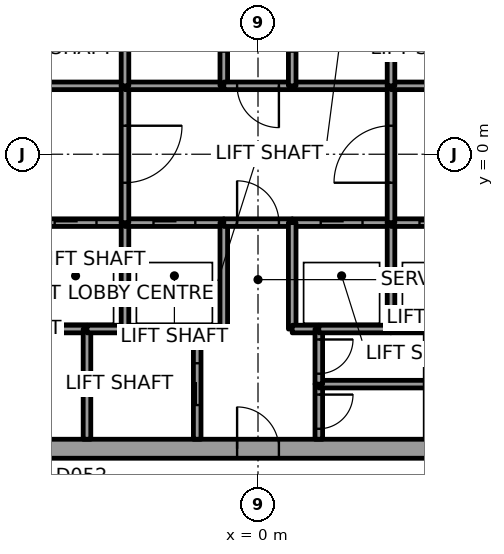
"""IFC4 building model, lengths in metres.
Left out: names, types, materials, properties, quantities, classifications, styles, units other than length and angle.
Written with IfcOpenShell. Run it as: python <this file> out.ifc"""

import sys

from ifc_helpers import new_model, si_unit, direction, frame, frame_2d, origin, place, context, subcontext, project, spatial, rectangle, extrude, element, fill, save


model = new_model("IFC4")
c1 = context("Model", 3, precision=1e-05, world=origin(), true_north=direction((0.0, 1.0)))
c2 = subcontext(c1, "Body", "Model", "MODEL_VIEW")
j1 = project(units=[si_unit("LENGTHUNIT", "METRE"), si_unit("PLANEANGLEUNIT", "RADIAN")], contexts=[c1])
p1 = place(None, origin())
s1 = spatial("IfcSite", under=j1, at=p1, CompositionType="ELEMENT")
p2 = place(p1, origin())
s2 = spatial("IfcBuilding", under=s1, at=p2, CompositionType="ELEMENT")
p3 = place(p2, frame((0.0, 0.0, 70.2)))
s3 = spatial("IfcBuildingStorey", under=s2, at=p3, CompositionType="ELEMENT", Elevation=70.2)
p4 = place(p3, frame((-11.0, -7.75, 0.0), z_axis=(0.0, 0.0, 1.0), x_axis=(1.0, 0.0, 0.0)))
e1 = element("IfcWall", 1, at=p4, inside=s3, PredefinedType="SHEAR", context=c2, shape_type="SweptSolid", body=[
    extrude(rectangle(XDim=22.0, YDim=0.5, at=frame_2d((11.0, 0.0))), origin(), (0.0, 0.0, 1.0), 3.7),
])
p5 = place(p4, frame((10.45, 0.0, 0.0)))
e2 = element("IfcOpeningElement", 2, at=p5, cuts=e1, PredefinedType="OPENING", context=c2, shape_type="SweptSolid", body=[
    extrude(rectangle(XDim=1.1, YDim=2.1, at=frame_2d((0.55, 1.05))), frame((0.0, 0.25, 0.0), z_axis=(0.0, -1.0, 0.0), x_axis=(1.0, 0.0, 0.0)), (0.0, 0.0, 1.0), 0.5),
])
p6 = place(p3, frame((-6.1, -4.6, 0.0), z_axis=(0.0, 0.0, 1.0), x_axis=(1.0, 0.0, 0.0)))
e3 = element("IfcWall", 3, at=p6, inside=s3, PredefinedType="SOLIDWALL", context=c2, shape_type="SweptSolid", body=[
    extrude(rectangle(XDim=1.6, YDim=0.2, at=frame_2d((0.8, 0.0))), origin(), (0.0, 0.0, 1.0), 3.55),
])
p7 = place(p3, frame((-6.1, -1.8, 0.0), z_axis=(0.0, 0.0, 1.0), x_axis=(1.0, 0.0, 0.0)))
e4 = element("IfcWall", 4, at=p7, inside=s3, PredefinedType="SOLIDWALL", context=c2, shape_type="SweptSolid", body=[
    extrude(rectangle(XDim=2.6, YDim=0.2, at=frame_2d((1.3, 0.0))), origin(), (0.0, 0.0, 1.0), 3.55),
])
p8 = place(p7, frame((0.75, 0.0, 0.0)))
e5 = element("IfcOpeningElement", 5, at=p8, cuts=e4, PredefinedType="OPENING", context=c2, shape_type="SweptSolid", body=[
    extrude(rectangle(XDim=1.1, YDim=2.1, at=frame_2d((0.55, 1.05))), frame((0.0, 0.1, 0.0), z_axis=(0.0, -1.0, 0.0), x_axis=(1.0, 0.0, 0.0)), (0.0, 0.0, 1.0), 0.2),
])
p9 = place(p3, frame((-3.5, 1.8, 0.0), z_axis=(0.0, 0.0, 1.0), x_axis=(-1.0, 0.0, 0.0)))
e6 = element("IfcWall", 6, at=p9, inside=s3, PredefinedType="SOLIDWALL", context=c2, shape_type="SweptSolid", body=[
    extrude(rectangle(XDim=2.6, YDim=0.2, at=frame_2d((1.3, 0.0))), origin(), (0.0, 0.0, 1.0), 3.55),
])
p10 = place(p3, frame((-4.5, -4.6, 0.0), z_axis=(0.0, 0.0, 1.0), x_axis=(0.0, -1.0, 0.0)))
e7 = element("IfcWall", 7, at=p10, inside=s3, PredefinedType="SOLIDWALL", context=c2, shape_type="SweptSolid", body=[
    extrude(rectangle(XDim=2.9, YDim=0.2, at=frame_2d((1.45, 0.0))), origin(), (0.0, 0.0, 1.0), 3.55),
])
p11 = place(p3, frame((-4.5, -4.6, 0.0), z_axis=(0.0, 0.0, 1.0), x_axis=(1.0, 0.0, 0.0)))
e8 = element("IfcWall", 8, at=p11, inside=s3, PredefinedType="SOLIDWALL", context=c2, shape_type="SweptSolid", body=[
    extrude(rectangle(XDim=1.0, YDim=0.2, at=frame_2d((0.5, 0.0))), origin(), (0.0, 0.0, 1.0), 3.55),
])
p12 = place(p3, frame((-3.5, -4.6, 0.0), z_axis=(0.0, 0.0, 1.0), x_axis=(1.0, 0.0, 0.0)))
e9 = element("IfcWall", 9, at=p12, inside=s3, PredefinedType="SOLIDWALL", context=c2, shape_type="SweptSolid", body=[
    extrude(rectangle(XDim=1.9, YDim=0.2, at=frame_2d((0.95, 0.0))), origin(), (0.0, 0.0, 1.0), 3.55),
])
p13 = place(p3, frame((-3.5, -4.6, 0.0), z_axis=(0.0, 0.0, 1.0), x_axis=(0.0, 1.0, 0.0)))
e10 = element("IfcWall", 10, at=p13, inside=s3, PredefinedType="SOLIDWALL", context=c2, shape_type="SweptSolid", body=[
    extrude(rectangle(XDim=2.8, YDim=0.2, at=frame_2d((1.4, 0.0))), origin(), (0.0, 0.0, 1.0), 3.55),
])
p14 = place(p3, frame((-3.5, -1.8, 0.0), z_axis=(0.0, 0.0, 1.0), x_axis=(1.0, 0.0, 0.0)))
e11 = element("IfcWall", 11, at=p14, inside=s3, PredefinedType="SOLIDWALL", context=c2, shape_type="SweptSolid", body=[
    extrude(rectangle(XDim=2.6, YDim=0.2, at=frame_2d((1.3, 0.0))), origin(), (0.0, 0.0, 1.0), 3.55),
])
p15 = place(p14, frame((0.75, 0.0, 0.0)))
e12 = element("IfcOpeningElement", 12, at=p15, cuts=e11, PredefinedType="OPENING", context=c2, shape_type="SweptSolid", body=[
    extrude(rectangle(XDim=1.1, YDim=2.1, at=frame_2d((0.55, 1.05))), frame((0.0, 0.1, 0.0), z_axis=(0.0, -1.0, 0.0), x_axis=(1.0, 0.0, 0.0)), (0.0, 0.0, 1.0), 0.2),
])
p16 = place(p3, frame((-3.5, 1.8, 0.0), z_axis=(0.0, 0.0, 1.0), x_axis=(0.0, -1.0, 0.0)))
e13 = element("IfcWall", 13, at=p16, inside=s3, PredefinedType="SOLIDWALL", context=c2, shape_type="SweptSolid", body=[
    extrude(rectangle(XDim=3.6, YDim=0.2, at=frame_2d((1.8, 0.0))), origin(), (0.0, 0.0, 1.0), 3.55),
])
p17 = place(p16, frame((1.05, 0.0, 0.0)))
e14 = element("IfcOpeningElement", 14, at=p17, cuts=e13, PredefinedType="OPENING", context=c2, shape_type="SweptSolid", body=[
    extrude(rectangle(XDim=1.5, YDim=2.1, at=frame_2d((0.75, 1.05))), frame((0.0, 0.1, 0.0), z_axis=(0.0, -1.0, 0.0), x_axis=(1.0, 0.0, 0.0)), (0.0, 0.0, 1.0), 0.2),
])
p18 = place(p3, frame((-0.9, 1.8, 0.0), z_axis=(0.0, 0.0, 1.0), x_axis=(-1.0, 0.0, 0.0)))
e15 = element("IfcWall", 15, at=p18, inside=s3, PredefinedType="SOLIDWALL", context=c2, shape_type="SweptSolid", body=[
    extrude(rectangle(XDim=2.6, YDim=0.2, at=frame_2d((1.3, 0.0))), origin(), (0.0, 0.0, 1.0), 3.55),
])
p19 = place(p3, frame((-3.5, 4.6, 0.0), z_axis=(0.0, 0.0, 1.0), x_axis=(0.0, -1.0, 0.0)))
e16 = element("IfcWall", 16, at=p19, inside=s3, PredefinedType="SOLIDWALL", context=c2, shape_type="SweptSolid", body=[
    extrude(rectangle(XDim=2.8, YDim=0.2, at=frame_2d((1.4, 0.0))), origin(), (0.0, 0.0, 1.0), 3.55),
])
p20 = place(p3, frame((-0.9, 1.8, 0.0), z_axis=(0.0, 0.0, 1.0), x_axis=(0.0, 1.0, 0.0)))
e17 = element("IfcWall", 17, at=p20, inside=s3, PredefinedType="SOLIDWALL", context=c2, shape_type="SweptSolid", body=[
    extrude(rectangle(XDim=3.0, YDim=0.2, at=frame_2d((1.5, 0.0))), origin(), (0.0, 0.0, 1.0), 3.55),
])
p21 = place(p20, frame((0.9, 0.0, 0.0)))
e18 = element("IfcOpeningElement", 18, at=p21, cuts=e17, PredefinedType="OPENING", context=c2, shape_type="SweptSolid", body=[
    extrude(rectangle(XDim=1.2, YDim=2.1, at=frame_2d((0.6, 1.05))), frame((0.0, 0.1, 0.0), z_axis=(0.0, -1.0, 0.0), x_axis=(1.0, 0.0, 0.0)), (0.0, 0.0, 1.0), 0.2),
])
p22 = place(p3, frame((-1.6, -7.5, 0.0), z_axis=(0.0, 0.0, 1.0), x_axis=(0.0, 1.0, 0.0)))
e19 = element("IfcWall", 19, at=p22, inside=s3, PredefinedType="SOLIDWALL", context=c2, shape_type="SweptSolid", body=[
    extrude(rectangle(XDim=2.9, YDim=0.2, at=frame_2d((1.45, 0.0))), origin(), (0.0, 0.0, 1.0), 3.55),
])
p23 = place(p22, frame((0.9, 0.0, 0.0)))
e20 = element("IfcOpeningElement", 20, at=p23, cuts=e19, PredefinedType="OPENING", context=c2, shape_type="SweptSolid", body=[
    extrude(rectangle(XDim=1.1, YDim=2.1, at=frame_2d((0.55, 1.05))), frame((0.0, 0.1, 0.0), z_axis=(0.0, -1.0, 0.0), x_axis=(1.0, 0.0, 0.0)), (0.0, 0.0, 1.0), 0.2),
])
p24 = place(p3, frame((-1.6, -4.6, 0.0), z_axis=(0.0, 0.0, 1.0), x_axis=(1.0, 0.0, 0.0)))
e21 = element("IfcWall", 21, at=p24, inside=s3, PredefinedType="SOLIDWALL", context=c2, shape_type="SweptSolid", body=[
    extrude(rectangle(XDim=0.7, YDim=0.2, at=frame_2d((0.35, 0.0))), origin(), (0.0, 0.0, 1.0), 3.55),
])
p25 = place(p3, frame((-0.9, -4.6, 0.0), z_axis=(0.0, 0.0, 1.0), x_axis=(0.0, 1.0, 0.0)))
e22 = element("IfcWall", 22, at=p25, inside=s3, PredefinedType="SOLIDWALL", context=c2, shape_type="SweptSolid", body=[
    extrude(rectangle(XDim=2.8, YDim=0.2, at=frame_2d((1.4, 0.0))), origin(), (0.0, 0.0, 1.0), 3.55),
])
p26 = place(p3, frame((-0.9, -1.8, 0.0), z_axis=(0.0, 0.0, 1.0), x_axis=(1.0, 0.0, 0.0)))
e23 = element("IfcWall", 23, at=p26, inside=s3, PredefinedType="SOLIDWALL", context=c2, shape_type="SweptSolid", body=[
    extrude(rectangle(XDim=1.8, YDim=0.2, at=frame_2d((0.9, 0.0))), origin(), (0.0, 0.0, 1.0), 3.55),
])
p27 = place(p26, frame((0.35, 0.0, 0.0)))
e24 = element("IfcOpeningElement", 24, at=p27, cuts=e23, PredefinedType="OPENING", context=c2, shape_type="SweptSolid", body=[
    extrude(rectangle(XDim=1.1, YDim=2.1, at=frame_2d((0.55, 1.05))), frame((0.0, 0.1, 0.0), z_axis=(0.0, -1.0, 0.0), x_axis=(1.0, 0.0, 0.0)), (0.0, 0.0, 1.0), 0.2),
])
p28 = place(p3, frame((0.9, 1.8, 0.0), z_axis=(0.0, 0.0, 1.0), x_axis=(-1.0, 0.0, 0.0)))
e25 = element("IfcWall", 25, at=p28, inside=s3, PredefinedType="SOLIDWALL", context=c2, shape_type="SweptSolid", body=[
    extrude(rectangle(XDim=1.8, YDim=0.2, at=frame_2d((0.9, 0.0))), origin(), (0.0, 0.0, 1.0), 3.55),
])
p29 = place(p28, frame((0.35, 0.0, 0.0)))
e26 = element("IfcOpeningElement", 26, at=p29, cuts=e25, PredefinedType="OPENING", context=c2, shape_type="SweptSolid", body=[
    extrude(rectangle(XDim=1.1, YDim=2.1, at=frame_2d((0.55, 1.05))), frame((0.0, 0.1, 0.0), z_axis=(0.0, -1.0, 0.0), x_axis=(1.0, 0.0, 0.0)), (0.0, 0.0, 1.0), 0.2),
])
p30 = place(p3, frame((0.9, -1.8, 0.0), z_axis=(0.0, 0.0, 1.0), x_axis=(1.0, 0.0, 0.0)))
e27 = element("IfcWall", 27, at=p30, inside=s3, PredefinedType="SOLIDWALL", context=c2, shape_type="SweptSolid", body=[
    extrude(rectangle(XDim=2.6, YDim=0.2, at=frame_2d((1.3, 0.0))), origin(), (0.0, 0.0, 1.0), 3.55),
])
p31 = place(p30, frame((0.75, 0.0, 0.0)))
e28 = element("IfcOpeningElement", 28, at=p31, cuts=e27, PredefinedType="OPENING", context=c2, shape_type="SweptSolid", body=[
    extrude(rectangle(XDim=1.1, YDim=2.1, at=frame_2d((0.55, 1.05))), frame((0.0, 0.1, 0.0), z_axis=(0.0, -1.0, 0.0), x_axis=(1.0, 0.0, 0.0)), (0.0, 0.0, 1.0), 0.2),
])
p32 = place(p3, frame((0.9, -1.8, 0.0), z_axis=(0.0, 0.0, 1.0), x_axis=(0.0, -1.0, 0.0)))
e29 = element("IfcWall", 29, at=p32, inside=s3, PredefinedType="SOLIDWALL", context=c2, shape_type="SweptSolid", body=[
    extrude(rectangle(XDim=2.8, YDim=0.2, at=frame_2d((1.4, 0.0))), origin(), (0.0, 0.0, 1.0), 3.55),
])
p33 = place(p3, frame((0.9, -4.6, 0.0), z_axis=(0.0, 0.0, 1.0), x_axis=(1.0, 0.0, 0.0)))
e30 = element("IfcWall", 30, at=p33, inside=s3, PredefinedType="SOLIDWALL", context=c2, shape_type="SweptSolid", body=[
    extrude(rectangle(XDim=0.7, YDim=0.2, at=frame_2d((0.35, 0.0))), origin(), (0.0, 0.0, 1.0), 3.55),
])
p34 = place(p3, frame((3.5, 1.8, 0.0), z_axis=(0.0, 0.0, 1.0), x_axis=(-1.0, 0.0, 0.0)))
e31 = element("IfcWall", 31, at=p34, inside=s3, PredefinedType="SOLIDWALL", context=c2, shape_type="SweptSolid", body=[
    extrude(rectangle(XDim=2.6, YDim=0.2, at=frame_2d((1.3, 0.0))), origin(), (0.0, 0.0, 1.0), 3.55),
])
p35 = place(p3, frame((0.9, 4.8, 0.0), z_axis=(0.0, 0.0, 1.0), x_axis=(0.0, -1.0, 0.0)))
e32 = element("IfcWall", 32, at=p35, inside=s3, PredefinedType="SOLIDWALL", context=c2, shape_type="SweptSolid", body=[
    extrude(rectangle(XDim=3.0, YDim=0.2, at=frame_2d((1.5, 0.0))), origin(), (0.0, 0.0, 1.0), 3.55),
])
p36 = place(p35, frame((0.9, 0.0, 0.0)))
e33 = element("IfcOpeningElement", 33, at=p36, cuts=e32, PredefinedType="OPENING", context=c2, shape_type="SweptSolid", body=[
    extrude(rectangle(XDim=1.2, YDim=2.1, at=frame_2d((0.6, 1.05))), frame((0.0, 0.1, 0.0), z_axis=(0.0, -1.0, 0.0), x_axis=(1.0, 0.0, 0.0)), (0.0, 0.0, 1.0), 0.2),
])
p37 = place(p3, frame((1.6, -6.05, 0.0), z_axis=(0.0, 0.0, 1.0), x_axis=(0.0, -1.0, 0.0)))
e34 = element("IfcWall", 34, at=p37, inside=s3, PredefinedType="SOLIDWALL", context=c2, shape_type="SweptSolid", body=[
    extrude(rectangle(XDim=1.45, YDim=0.2, at=frame_2d((0.725, 0.0))), origin(), (0.0, 0.0, 1.0), 3.55),
])
p38 = place(p37, frame((0.275, 0.0, 0.0)))
e35 = element("IfcOpeningElement", 35, at=p38, cuts=e34, PredefinedType="OPENING", context=c2, shape_type="SweptSolid", body=[
    extrude(rectangle(XDim=0.9, YDim=2.1, at=frame_2d((0.45, 1.05))), frame((0.0, 0.1, 0.0), z_axis=(0.0, -1.0, 0.0), x_axis=(1.0, 0.0, 0.0)), (0.0, 0.0, 1.0), 0.2),
])
p39 = place(p3, frame((4.5, -6.05, 0.0), z_axis=(0.0, 0.0, 1.0), x_axis=(-1.0, 0.0, 0.0)))
e36 = element("IfcWall", 36, at=p39, inside=s3, PredefinedType="SOLIDWALL", context=c2, shape_type="SweptSolid", body=[
    extrude(rectangle(XDim=2.9, YDim=0.2, at=frame_2d((1.45, 0.0))), origin(), (0.0, 0.0, 1.0), 3.55),
])
p40 = place(p3, frame((1.6, -4.6, 0.0), z_axis=(0.0, 0.0, 1.0), x_axis=(0.0, -1.0, 0.0)))
e37 = element("IfcWall", 37, at=p40, inside=s3, PredefinedType="SOLIDWALL", context=c2, shape_type="SweptSolid", body=[
    extrude(rectangle(XDim=1.45, YDim=0.2, at=frame_2d((0.725, 0.0))), origin(), (0.0, 0.0, 1.0), 3.55),
])
p41 = place(p40, frame((0.275, 0.0, 0.0)))
e38 = element("IfcOpeningElement", 38, at=p41, cuts=e37, PredefinedType="OPENING", context=c2, shape_type="SweptSolid", body=[
    extrude(rectangle(XDim=0.9, YDim=2.1, at=frame_2d((0.45, 1.05))), frame((0.0, 0.1, 0.0), z_axis=(0.0, -1.0, 0.0), x_axis=(1.0, 0.0, 0.0)), (0.0, 0.0, 1.0), 0.2),
])
p42 = place(p3, frame((3.5, -4.6, 0.0), z_axis=(0.0, 0.0, 1.0), x_axis=(-1.0, 0.0, 0.0)))
e39 = element("IfcWall", 39, at=p42, inside=s3, PredefinedType="SOLIDWALL", context=c2, shape_type="SweptSolid", body=[
    extrude(rectangle(XDim=1.9, YDim=0.2, at=frame_2d((0.95, 0.0))), origin(), (0.0, 0.0, 1.0), 3.55),
])
p43 = place(p3, frame((4.5, -4.6, 0.0), z_axis=(0.0, 0.0, 1.0), x_axis=(-1.0, 0.0, 0.0)))
e40 = element("IfcWall", 40, at=p43, inside=s3, PredefinedType="SOLIDWALL", context=c2, shape_type="SweptSolid", body=[
    extrude(rectangle(XDim=1.0, YDim=0.2, at=frame_2d((0.5, 0.0))), origin(), (0.0, 0.0, 1.0), 3.55),
])
p44 = place(p3, frame((3.5, -4.6, 0.0), z_axis=(0.0, 0.0, 1.0), x_axis=(0.0, 1.0, 0.0)))
e41 = element("IfcWall", 41, at=p44, inside=s3, PredefinedType="SOLIDWALL", context=c2, shape_type="SweptSolid", body=[
    extrude(rectangle(XDim=2.8, YDim=0.2, at=frame_2d((1.4, 0.0))), origin(), (0.0, 0.0, 1.0), 3.55),
])
p45 = place(p3, frame((3.5, -1.8, 0.0), z_axis=(0.0, 0.0, 1.0), x_axis=(1.0, 0.0, 0.0)))
e42 = element("IfcWall", 42, at=p45, inside=s3, PredefinedType="SOLIDWALL", context=c2, shape_type="SweptSolid", body=[
    extrude(rectangle(XDim=2.6, YDim=0.2, at=frame_2d((1.3, 0.0))), origin(), (0.0, 0.0, 1.0), 3.55),
])
p46 = place(p45, frame((0.75, 0.0, 0.0)))
e43 = element("IfcOpeningElement", 43, at=p46, cuts=e42, PredefinedType="OPENING", context=c2, shape_type="SweptSolid", body=[
    extrude(rectangle(XDim=1.1, YDim=2.1, at=frame_2d((0.55, 1.05))), frame((0.0, 0.1, 0.0), z_axis=(0.0, -1.0, 0.0), x_axis=(1.0, 0.0, 0.0)), (0.0, 0.0, 1.0), 0.2),
])
p47 = place(p3, frame((3.5, -1.8, 0.0), z_axis=(0.0, 0.0, 1.0), x_axis=(0.0, 1.0, 0.0)))
e44 = element("IfcWall", 44, at=p47, inside=s3, PredefinedType="SOLIDWALL", context=c2, shape_type="SweptSolid", body=[
    extrude(rectangle(XDim=3.6, YDim=0.2, at=frame_2d((1.8, 0.0))), origin(), (0.0, 0.0, 1.0), 3.55),
])
p48 = place(p47, frame((1.05, 0.0, 0.0)))
e45 = element("IfcOpeningElement", 45, at=p48, cuts=e44, PredefinedType="OPENING", context=c2, shape_type="SweptSolid", body=[
    extrude(rectangle(XDim=1.5, YDim=2.1, at=frame_2d((0.75, 1.05))), frame((0.0, 0.1, 0.0), z_axis=(0.0, -1.0, 0.0), x_axis=(1.0, 0.0, 0.0)), (0.0, 0.0, 1.0), 0.2),
])
p49 = place(p3, frame((6.1, 1.8, 0.0), z_axis=(0.0, 0.0, 1.0), x_axis=(-1.0, 0.0, 0.0)))
e46 = element("IfcWall", 46, at=p49, inside=s3, PredefinedType="SOLIDWALL", context=c2, shape_type="SweptSolid", body=[
    extrude(rectangle(XDim=2.6, YDim=0.2, at=frame_2d((1.3, 0.0))), origin(), (0.0, 0.0, 1.0), 3.55),
])
p50 = place(p3, frame((3.5, 1.8, 0.0), z_axis=(0.0, 0.0, 1.0), x_axis=(0.0, 1.0, 0.0)))
e47 = element("IfcWall", 47, at=p50, inside=s3, PredefinedType="SOLIDWALL", context=c2, shape_type="SweptSolid", body=[
    extrude(rectangle(XDim=2.8, YDim=0.2, at=frame_2d((1.4, 0.0))), origin(), (0.0, 0.0, 1.0), 3.55),
])
p51 = place(p8, origin())
e48 = element("IfcDoor", 48, at=p51, inside=s3, OperationType="SLIDING_TO_RIGHT", PredefinedType="DOOR", context=c2, shape_type="SweptSolid", body=[
    extrude(rectangle(XDim=1.1, YDim=2.1, at=frame_2d((0.55, 1.05))), frame((0.0, 0.025, 0.0), z_axis=(0.0, -1.0, 0.0), x_axis=(1.0, 0.0, 0.0)), (0.0, 0.0, 1.0), 0.05),
])
fill(e5, e48)
p52 = place(p15, origin())
e49 = element("IfcDoor", 49, at=p52, inside=s3, OperationType="SLIDING_TO_RIGHT", PredefinedType="DOOR", context=c2, shape_type="SweptSolid", body=[
    extrude(rectangle(XDim=1.1, YDim=2.1, at=frame_2d((0.55, 1.05))), frame((0.0, 0.025, 0.0), z_axis=(0.0, -1.0, 0.0), x_axis=(1.0, 0.0, 0.0)), (0.0, 0.0, 1.0), 0.05),
])
fill(e12, e49)
p53 = place(p31, origin())
e50 = element("IfcDoor", 50, at=p53, inside=s3, OperationType="SLIDING_TO_RIGHT", PredefinedType="DOOR", context=c2, shape_type="SweptSolid", body=[
    extrude(rectangle(XDim=1.1, YDim=2.1, at=frame_2d((0.55, 1.05))), frame((0.0, 0.025, 0.0), z_axis=(0.0, -1.0, 0.0), x_axis=(1.0, 0.0, 0.0)), (0.0, 0.0, 1.0), 0.05),
])
fill(e28, e50)
p54 = place(p46, origin())
e51 = element("IfcDoor", 51, at=p54, inside=s3, OperationType="SLIDING_TO_LEFT", PredefinedType="DOOR", context=c2, shape_type="SweptSolid", body=[
    extrude(rectangle(XDim=1.1, YDim=2.1, at=frame_2d((0.55, 1.05))), frame((0.0, 0.025, 0.0), z_axis=(0.0, -1.0, 0.0), x_axis=(1.0, 0.0, 0.0)), (0.0, 0.0, 1.0), 0.05),
])
fill(e43, e51)
p55 = place(p23, origin())
e52 = element("IfcDoor", 52, at=p55, inside=s3, OperationType="SLIDING_TO_LEFT", PredefinedType="DOOR", context=c2, shape_type="SweptSolid", body=[
    extrude(rectangle(XDim=1.1, YDim=2.1, at=frame_2d((0.55, 1.05))), frame((0.0, 0.025, 0.0), z_axis=(0.0, -1.0, 0.0), x_axis=(1.0, 0.0, 0.0)), (0.0, 0.0, 1.0), 0.05),
])
fill(e20, e52)
p56 = place(p17, origin())
e53 = element("IfcDoor", 53, at=p56, inside=s3, OperationType="DOUBLE_DOOR_SINGLE_SWING", PredefinedType="DOOR", context=c2, shape_type="SweptSolid", body=[
    extrude(rectangle(XDim=1.5, YDim=2.1, at=frame_2d((0.75, 1.05))), frame((0.0, 0.025, 0.0), z_axis=(0.0, -1.0, 0.0), x_axis=(1.0, 0.0, 0.0)), (0.0, 0.0, 1.0), 0.05),
])
fill(e14, e53)
p57 = place(p48, origin())
e54 = element("IfcDoor", 54, at=p57, inside=s3, OperationType="DOUBLE_DOOR_SINGLE_SWING", PredefinedType="DOOR", context=c2, shape_type="SweptSolid", body=[
    extrude(rectangle(XDim=1.5, YDim=2.1, at=frame_2d((0.75, 1.05))), frame((0.0, 0.025, 0.0), z_axis=(0.0, -1.0, 0.0), x_axis=(1.0, 0.0, 0.0)), (0.0, 0.0, 1.0), 0.05),
])
fill(e45, e54)
p58 = place(p29, origin())
e55 = element("IfcDoor", 55, at=p58, inside=s3, OperationType="SINGLE_SWING_RIGHT", PredefinedType="DOOR", context=c2, shape_type="SweptSolid", body=[
    extrude(rectangle(XDim=1.1, YDim=2.1, at=frame_2d((0.55, 1.05))), frame((0.0, 0.025, 0.0), z_axis=(0.0, -1.0, 0.0), x_axis=(1.0, 0.0, 0.0)), (0.0, 0.0, 1.0), 0.05),
])
fill(e26, e55)
p59 = place(p27, origin())
e56 = element("IfcDoor", 56, at=p59, inside=s3, OperationType="SINGLE_SWING_LEFT", PredefinedType="DOOR", context=c2, shape_type="SweptSolid", body=[
    extrude(rectangle(XDim=1.1, YDim=2.1, at=frame_2d((0.55, 1.05))), frame((0.0, 0.025, 0.0), z_axis=(0.0, -1.0, 0.0), x_axis=(1.0, 0.0, 0.0)), (0.0, 0.0, 1.0), 0.05),
])
fill(e24, e56)
p60 = place(p38, origin())
e57 = element("IfcDoor", 57, at=p60, inside=s3, OperationType="SINGLE_SWING_LEFT", PredefinedType="DOOR", context=c2, shape_type="SweptSolid", body=[
    extrude(rectangle(XDim=0.9, YDim=2.1, at=frame_2d((0.45, 1.05))), frame((0.0, 0.025, 0.0), z_axis=(0.0, -1.0, 0.0), x_axis=(1.0, 0.0, 0.0)), (0.0, 0.0, 1.0), 0.05),
])
fill(e35, e57)
p61 = place(p41, origin())
e58 = element("IfcDoor", 58, at=p61, inside=s3, OperationType="SINGLE_SWING_LEFT", PredefinedType="DOOR", context=c2, shape_type="SweptSolid", body=[
    extrude(rectangle(XDim=0.9, YDim=2.1, at=frame_2d((0.45, 1.05))), frame((0.0, 0.025, 0.0), z_axis=(0.0, -1.0, 0.0), x_axis=(1.0, 0.0, 0.0)), (0.0, 0.0, 1.0), 0.05),
])
fill(e38, e58)
p62 = place(p5, origin())
e59 = element("IfcDoor", 59, at=p62, inside=s3, OperationType="SINGLE_SWING_RIGHT", PredefinedType="DOOR", context=c2, shape_type="SweptSolid", body=[
    extrude(rectangle(XDim=1.1, YDim=2.1, at=frame_2d((0.55, 1.05))), frame((0.0, 0.025, 0.0), z_axis=(0.0, -1.0, 0.0), x_axis=(1.0, 0.0, 0.0)), (0.0, 0.0, 1.0), 0.05),
])
fill(e2, e59)
save(model, sys.argv[1])
